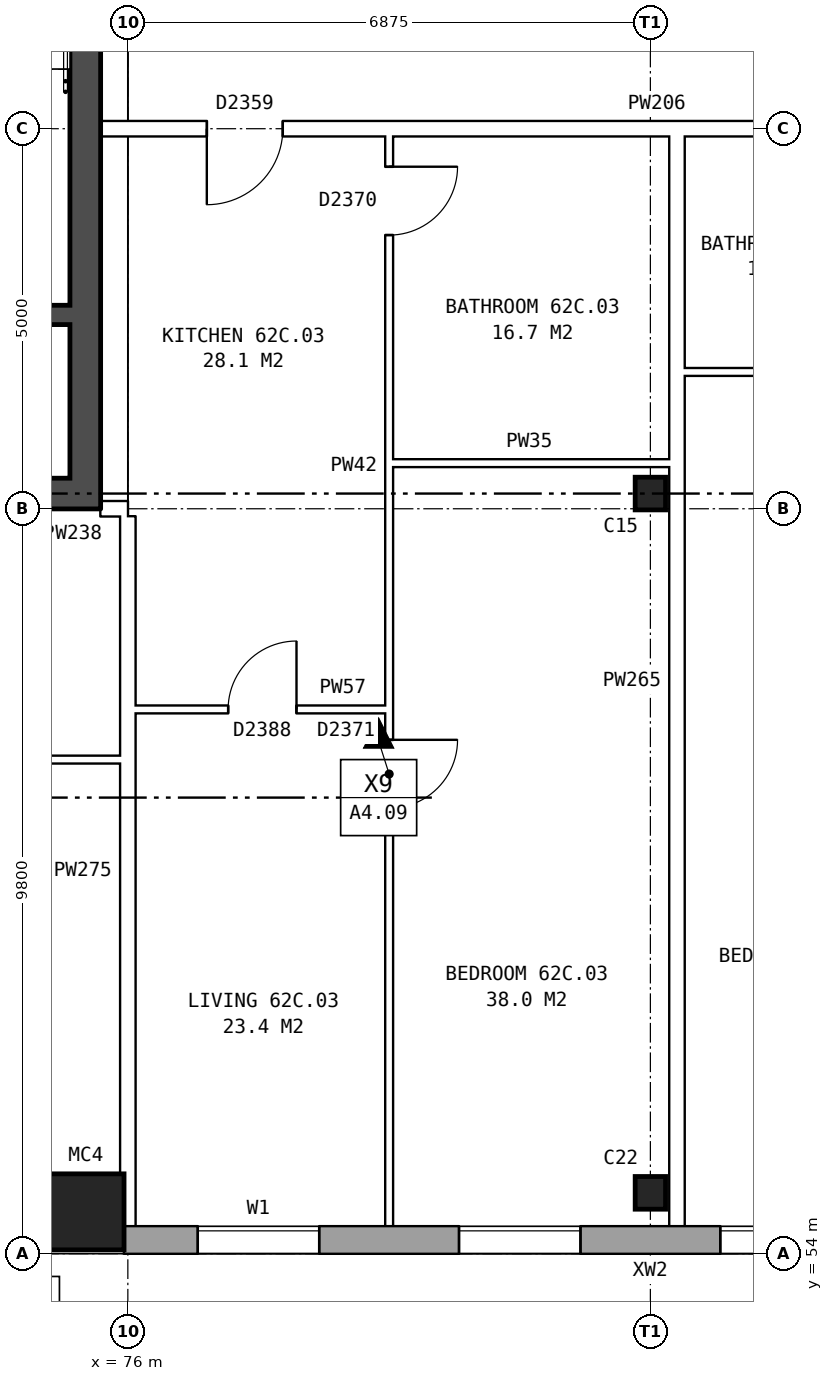
"""IFC4 building model, lengths in metres.
Left out: names, types, materials, properties, quantities, classifications, styles, units other than length and angle.
Written with IfcOpenShell. Run it as: python <this file> out.ifc"""

import sys

from ifc_helpers import new_model, si_unit, direction, frame, frame_2d, origin, origin_2d, place, context, subcontext, project, spatial, rectangle, hollow_rectangle, i_section, extrude, element, fill, save


model = new_model("IFC4")
c1 = context("Model", 3, precision=1e-05, world=origin(), true_north=direction((0.0, 1.0)))
c2 = subcontext(c1, "Body", "Model", "MODEL_VIEW")
j1 = project(units=[si_unit("LENGTHUNIT", "METRE"), si_unit("PLANEANGLEUNIT", "RADIAN")], contexts=[c1])
p1 = place(None, origin())
s1 = spatial("IfcSite", under=j1, at=p1, CompositionType="ELEMENT")
p2 = place(p1, origin())
s2 = spatial("IfcBuilding", under=s1, at=p2, CompositionType="ELEMENT")
p3 = place(p2, frame((0.0, 0.0, 221.4)))
s3 = spatial("IfcBuildingStorey", under=s2, at=p3, CompositionType="ELEMENT", Elevation=221.4)
p4 = place(p3, frame((75.45, 54.55, 0.0), z_axis=(0.0, 0.0, 1.0), x_axis=(1.0, 0.0, 0.0)))
e1 = element("IfcColumn", 1, at=p4, inside=s3, PredefinedType="COLUMN", context=c2, shape_type="SweptSolid", body=[
    extrude(hollow_rectangle(XDim=1.0, YDim=1.0, WallThickness=0.055, at=origin_2d()), origin(), (0.0, 0.0, 1.0), 3.1),
])
for number, where, z_axis, x_axis in (
    (2, (82.875, 54.8, 0.0), (0.0, 0.0, 1.0), (1.0, 0.0, 0.0)),
    (3, (82.875, 64.0, 0.0), (0.0, 0.0, 1.0), (1.0, 0.0, 0.0)),
):
    element("IfcColumn", number, at=place(p3, frame(where, z_axis=z_axis, x_axis=x_axis)), inside=s3, PredefinedType="COLUMN", context=c2, shape_type="SweptSolid", body=[
        extrude(i_section(OverallWidth=0.4, OverallDepth=0.43, WebThickness=0.04, FlangeThickness=0.04, at=origin_2d()), origin(), (0.0, 0.0, 1.0), 2.85),
    ])
p5 = place(p3, frame((75.95, 54.18, 0.0), z_axis=(0.0, 0.0, 1.0), x_axis=(1.0, 0.0, 0.0)))
e4 = element("IfcWall", 4, at=p5, inside=s3, PredefinedType="STANDARD", context=c2, shape_type="SweptSolid", body=[
    extrude(rectangle(XDim=55.1, YDim=0.36, at=frame_2d((27.55, 0.0))), origin(), (0.0, 0.0, 1.0), 2.85),
])
p6 = place(p5, frame((0.969, 0.0, 0.8)))
e5 = element("IfcOpeningElement", 5, at=p6, cuts=e4, PredefinedType="OPENING", context=c2, shape_type="SweptSolid", body=[
    extrude(rectangle(XDim=1.6, YDim=1.8, at=frame_2d((0.8, 0.9))), frame((0.0, 0.19, 0.0), z_axis=(0.0, -1.0, 0.0), x_axis=(1.0, 0.0, 0.0)), (0.0, 0.0, 1.0), 0.38),
])
p7 = place(p5, frame((4.406, 0.0, 0.8)))
e6 = element("IfcOpeningElement", 6, at=p7, cuts=e4, PredefinedType="OPENING", context=c2, shape_type="SweptSolid", body=[
    extrude(rectangle(XDim=1.6, YDim=1.8, at=frame_2d((0.8, 0.9))), frame((0.0, 0.19, 0.0), z_axis=(0.0, -1.0, 0.0), x_axis=(1.0, 0.0, 0.0)), (0.0, 0.0, 1.0), 0.38),
])
p8 = place(p5, frame((7.844, 0.0, 0.8)))
e7 = element("IfcOpeningElement", 7, at=p8, cuts=e4, PredefinedType="OPENING", context=c2, shape_type="SweptSolid", body=[
    extrude(rectangle(XDim=1.6, YDim=1.8, at=frame_2d((0.8, 0.9))), frame((0.0, 0.19, 0.0), z_axis=(0.0, -1.0, 0.0), x_axis=(1.0, 0.0, 0.0)), (0.0, 0.0, 1.0), 0.38),
])
p9 = place(p5, frame((11.281, 0.0, 0.8)))
e8 = element("IfcOpeningElement", 8, at=p9, cuts=e4, PredefinedType="OPENING", context=c2, shape_type="SweptSolid", body=[
    extrude(rectangle(XDim=1.6, YDim=1.8, at=frame_2d((0.8, 0.9))), frame((0.0, 0.19, 0.0), z_axis=(0.0, -1.0, 0.0), x_axis=(1.0, 0.0, 0.0)), (0.0, 0.0, 1.0), 0.38),
])
p10 = place(p5, frame((14.719, 0.0, 0.8)))
e9 = element("IfcOpeningElement", 9, at=p10, cuts=e4, PredefinedType="OPENING", context=c2, shape_type="SweptSolid", body=[
    extrude(rectangle(XDim=1.6, YDim=1.8, at=frame_2d((0.8, 0.9))), frame((0.0, 0.19, 0.0), z_axis=(0.0, -1.0, 0.0), x_axis=(1.0, 0.0, 0.0)), (0.0, 0.0, 1.0), 0.38),
])
p11 = place(p5, frame((18.156, 0.0, 0.8)))
e10 = element("IfcOpeningElement", 10, at=p11, cuts=e4, PredefinedType="OPENING", context=c2, shape_type="SweptSolid", body=[
    extrude(rectangle(XDim=1.6, YDim=1.8, at=frame_2d((0.8, 0.9))), frame((0.0, 0.19, 0.0), z_axis=(0.0, -1.0, 0.0), x_axis=(1.0, 0.0, 0.0)), (0.0, 0.0, 1.0), 0.38),
])
p12 = place(p5, frame((21.594, 0.0, 0.8)))
e11 = element("IfcOpeningElement", 11, at=p12, cuts=e4, PredefinedType="OPENING", context=c2, shape_type="SweptSolid", body=[
    extrude(rectangle(XDim=1.6, YDim=1.8, at=frame_2d((0.8, 0.9))), frame((0.0, 0.19, 0.0), z_axis=(0.0, -1.0, 0.0), x_axis=(1.0, 0.0, 0.0)), (0.0, 0.0, 1.0), 0.38),
])
p13 = place(p5, frame((25.031, 0.0, 0.8)))
e12 = element("IfcOpeningElement", 12, at=p13, cuts=e4, PredefinedType="OPENING", context=c2, shape_type="SweptSolid", body=[
    extrude(rectangle(XDim=1.6, YDim=1.8, at=frame_2d((0.8, 0.9))), frame((0.0, 0.19, 0.0), z_axis=(0.0, -1.0, 0.0), x_axis=(1.0, 0.0, 0.0)), (0.0, 0.0, 1.0), 0.38),
])
p14 = place(p5, frame((28.469, 0.0, 0.8)))
e13 = element("IfcOpeningElement", 13, at=p14, cuts=e4, PredefinedType="OPENING", context=c2, shape_type="SweptSolid", body=[
    extrude(rectangle(XDim=1.6, YDim=1.8, at=frame_2d((0.8, 0.9))), frame((0.0, 0.19, 0.0), z_axis=(0.0, -1.0, 0.0), x_axis=(1.0, 0.0, 0.0)), (0.0, 0.0, 1.0), 0.38),
])
p15 = place(p5, frame((31.906, 0.0, 0.8)))
e14 = element("IfcOpeningElement", 14, at=p15, cuts=e4, PredefinedType="OPENING", context=c2, shape_type="SweptSolid", body=[
    extrude(rectangle(XDim=1.6, YDim=1.8, at=frame_2d((0.8, 0.9))), frame((0.0, 0.19, 0.0), z_axis=(0.0, -1.0, 0.0), x_axis=(1.0, 0.0, 0.0)), (0.0, 0.0, 1.0), 0.38),
])
p16 = place(p5, frame((35.344, 0.0, 0.8)))
e15 = element("IfcOpeningElement", 15, at=p16, cuts=e4, PredefinedType="OPENING", context=c2, shape_type="SweptSolid", body=[
    extrude(rectangle(XDim=1.6, YDim=1.8, at=frame_2d((0.8, 0.9))), frame((0.0, 0.19, 0.0), z_axis=(0.0, -1.0, 0.0), x_axis=(1.0, 0.0, 0.0)), (0.0, 0.0, 1.0), 0.38),
])
p17 = place(p5, frame((38.781, 0.0, 0.8)))
e16 = element("IfcOpeningElement", 16, at=p17, cuts=e4, PredefinedType="OPENING", context=c2, shape_type="SweptSolid", body=[
    extrude(rectangle(XDim=1.6, YDim=1.8, at=frame_2d((0.8, 0.9))), frame((0.0, 0.19, 0.0), z_axis=(0.0, -1.0, 0.0), x_axis=(1.0, 0.0, 0.0)), (0.0, 0.0, 1.0), 0.38),
])
p18 = place(p5, frame((42.219, 0.0, 0.8)))
e17 = element("IfcOpeningElement", 17, at=p18, cuts=e4, PredefinedType="OPENING", context=c2, shape_type="SweptSolid", body=[
    extrude(rectangle(XDim=1.6, YDim=1.8, at=frame_2d((0.8, 0.9))), frame((0.0, 0.19, 0.0), z_axis=(0.0, -1.0, 0.0), x_axis=(1.0, 0.0, 0.0)), (0.0, 0.0, 1.0), 0.38),
])
p19 = place(p5, frame((45.656, 0.0, 0.8)))
e18 = element("IfcOpeningElement", 18, at=p19, cuts=e4, PredefinedType="OPENING", context=c2, shape_type="SweptSolid", body=[
    extrude(rectangle(XDim=1.6, YDim=1.8, at=frame_2d((0.8, 0.9))), frame((0.0, 0.19, 0.0), z_axis=(0.0, -1.0, 0.0), x_axis=(1.0, 0.0, 0.0)), (0.0, 0.0, 1.0), 0.38),
])
p20 = place(p5, frame((49.094, 0.0, 0.8)))
e19 = element("IfcOpeningElement", 19, at=p20, cuts=e4, PredefinedType="OPENING", context=c2, shape_type="SweptSolid", body=[
    extrude(rectangle(XDim=1.6, YDim=1.8, at=frame_2d((0.8, 0.9))), frame((0.0, 0.19, 0.0), z_axis=(0.0, -1.0, 0.0), x_axis=(1.0, 0.0, 0.0)), (0.0, 0.0, 1.0), 0.38),
])
p21 = place(p5, frame((52.531, 0.0, 0.8)))
e20 = element("IfcOpeningElement", 20, at=p21, cuts=e4, PredefinedType="OPENING", context=c2, shape_type="SweptSolid", body=[
    extrude(rectangle(XDim=1.6, YDim=1.8, at=frame_2d((0.8, 0.9))), frame((0.0, 0.19, 0.0), z_axis=(0.0, -1.0, 0.0), x_axis=(1.0, 0.0, 0.0)), (0.0, 0.0, 1.0), 0.38),
])
p22 = place(p3, frame((75.44, 63.8, 0.0), z_axis=(0.0, 0.0, 1.0), x_axis=(0.0, 1.0, 0.0)))
e21 = element("IfcWall", 21, at=p22, inside=s3, PredefinedType="SHEAR", context=c2, shape_type="SweptSolid", body=[
    extrude(rectangle(XDim=12.4, YDim=0.4, at=frame_2d((6.2, 0.0))), origin(), (0.0, 0.0, 1.0), 2.85),
])
p23 = place(p22, frame((9.8, 0.0, 0.0)))
e22 = element("IfcOpeningElement", 22, at=p23, cuts=e21, PredefinedType="OPENING", context=c2, shape_type="SweptSolid", body=[
    extrude(rectangle(XDim=1.1, YDim=2.1, at=frame_2d((0.55, 1.05))), frame((0.0, 0.21, 0.0), z_axis=(0.0, -1.0, 0.0), x_axis=(1.0, 0.0, 0.0)), (0.0, 0.0, 1.0), 0.42),
])
p24 = place(p3, frame((67.04, 64.0, 0.0), z_axis=(0.0, 0.0, 1.0), x_axis=(1.0, 0.0, 0.0)))
e23 = element("IfcWall", 23, at=p24, inside=s3, PredefinedType="SHEAR", context=c2, shape_type="SweptSolid", body=[
    extrude(rectangle(XDim=8.2, YDim=0.4, at=frame_2d((4.1, 0.0))), origin(), (0.0, 0.0, 1.0), 2.85),
])
p25 = place(p3, frame((72.165, 66.35, 0.0), z_axis=(0.0, 0.0, 1.0), x_axis=(1.0, 0.0, 0.0)))
e24 = element("IfcWall", 24, at=p25, inside=s3, PredefinedType="SHEAR", context=c2, shape_type="SweptSolid", body=[
    extrude(rectangle(XDim=3.075, YDim=0.25, at=frame_2d((1.538, 0.0))), origin(), (0.0, 0.0, 1.0), 2.85),
])
p26 = place(p3, frame((70.1, 60.5, 0.0), z_axis=(0.0, 0.0, 1.0), x_axis=(1.0, 0.0, 0.0)))
e25 = element("IfcWall", 25, at=p26, inside=s3, PredefinedType="PARTITIONING", context=c2, shape_type="SweptSolid", body=[
    extrude(rectangle(XDim=5.8, YDim=0.1, at=frame_2d((2.9, 0.0))), origin(), (0.0, 0.0, 1.0), 2.85),
])
p27 = place(p3, frame((76.1, 61.16, 0.0), z_axis=(0.0, 0.0, 1.0), x_axis=(1.0, 0.0, 0.0)))
e26 = element("IfcWall", 26, at=p27, inside=s3, PredefinedType="PARTITIONING", context=c2, shape_type="SweptSolid", body=[
    extrude(rectangle(XDim=3.338, YDim=0.1, at=frame_2d((1.669, 0.0))), origin(), (0.0, 0.0, 1.0), 2.85),
])
p28 = place(p27, frame((1.219, 0.0, 0.0)))
e27 = element("IfcOpeningElement", 27, at=p28, cuts=e26, PredefinedType="OPENING", context=c2, shape_type="SweptSolid", body=[
    extrude(rectangle(XDim=0.9, YDim=2.1, at=frame_2d((0.45, 1.05))), frame((0.0, 0.06, 0.0), z_axis=(0.0, -1.0, 0.0), x_axis=(1.0, 0.0, 0.0)), (0.0, 0.0, 1.0), 0.12),
])
p29 = place(p3, frame((75.64, 63.8, 0.0), z_axis=(0.0, 0.0, 1.0), x_axis=(1.0, 0.0, 0.0)))
e28 = element("IfcWall", 28, at=p29, inside=s3, PredefinedType="PARTITIONING", context=c2, shape_type="SweptSolid", body=[
    extrude(rectangle(XDim=0.36, YDim=0.2, at=frame_2d((0.18, 0.0))), origin(), (0.0, 0.0, 1.0), 2.85),
])
p30 = place(p3, frame((79.438, 64.4, 0.0), z_axis=(0.0, 0.0, 1.0), x_axis=(1.0, 0.0, 0.0)))
e29 = element("IfcWall", 29, at=p30, inside=s3, PredefinedType="PARTITIONING", context=c2, shape_type="SweptSolid", body=[
    extrude(rectangle(XDim=3.687, YDim=0.1, at=frame_2d((1.844, 0.0))), origin(), (0.0, 0.0, 1.0), 2.85),
])
p31 = place(p3, frame((83.325, 65.6, 0.0), z_axis=(0.0, 0.0, 1.0), x_axis=(1.0, 0.0, 0.0)))
e30 = element("IfcWall", 30, at=p31, inside=s3, PredefinedType="PARTITIONING", context=c2, shape_type="SweptSolid", body=[
    extrude(rectangle(XDim=3.337, YDim=0.1, at=frame_2d((1.668, 0.0))), origin(), (0.0, 0.0, 1.0), 2.85),
])
p32 = place(p3, frame((75.64, 68.8, 0.0), z_axis=(0.0, 0.0, 1.0), x_axis=(1.0, 0.0, 0.0)))
e31 = element("IfcWall", 31, at=p32, inside=s3, PredefinedType="PARTITIONING", context=c2, shape_type="SweptSolid", body=[
    extrude(rectangle(XDim=55.72, YDim=0.2, at=frame_2d((27.86, 0.0))), origin(), (0.0, 0.0, 1.0), 2.85),
])
p33 = place(p32, frame((1.399, 0.0, 0.0)))
e32 = element("IfcOpeningElement", 32, at=p33, cuts=e31, PredefinedType="OPENING", context=c2, shape_type="SweptSolid", body=[
    extrude(rectangle(XDim=1.0, YDim=2.1, at=frame_2d((0.5, 1.05))), frame((0.0, 0.11, 0.0), z_axis=(0.0, -1.0, 0.0), x_axis=(1.0, 0.0, 0.0)), (0.0, 0.0, 1.0), 0.22),
])
p34 = place(p32, frame((12.241, 0.0, 0.0)))
e33 = element("IfcOpeningElement", 33, at=p34, cuts=e31, PredefinedType="OPENING", context=c2, shape_type="SweptSolid", body=[
    extrude(rectangle(XDim=1.0, YDim=2.1, at=frame_2d((0.5, 1.05))), frame((0.0, 0.11, 0.0), z_axis=(0.0, -1.0, 0.0), x_axis=(1.0, 0.0, 0.0)), (0.0, 0.0, 1.0), 0.22),
])
p35 = place(p32, frame((22.553, 0.0, 0.0)))
e34 = element("IfcOpeningElement", 34, at=p35, cuts=e31, PredefinedType="OPENING", context=c2, shape_type="SweptSolid", body=[
    extrude(rectangle(XDim=1.0, YDim=2.1, at=frame_2d((0.5, 1.05))), frame((0.0, 0.11, 0.0), z_axis=(0.0, -1.0, 0.0), x_axis=(1.0, 0.0, 0.0)), (0.0, 0.0, 1.0), 0.22),
])
p36 = place(p32, frame((32.866, 0.0, 0.0)))
e35 = element("IfcOpeningElement", 35, at=p36, cuts=e31, PredefinedType="OPENING", context=c2, shape_type="SweptSolid", body=[
    extrude(rectangle(XDim=1.0, YDim=2.1, at=frame_2d((0.5, 1.05))), frame((0.0, 0.11, 0.0), z_axis=(0.0, -1.0, 0.0), x_axis=(1.0, 0.0, 0.0)), (0.0, 0.0, 1.0), 0.22),
])
p37 = place(p32, frame((36.303, 0.0, 0.0)))
e36 = element("IfcOpeningElement", 36, at=p37, cuts=e31, PredefinedType="OPENING", context=c2, shape_type="SweptSolid", body=[
    extrude(rectangle(XDim=1.0, YDim=2.1, at=frame_2d((0.5, 1.05))), frame((0.0, 0.11, 0.0), z_axis=(0.0, -1.0, 0.0), x_axis=(1.0, 0.0, 0.0)), (0.0, 0.0, 1.0), 0.22),
])
p38 = place(p32, frame((46.616, 0.0, 0.0)))
e37 = element("IfcOpeningElement", 37, at=p38, cuts=e31, PredefinedType="OPENING", context=c2, shape_type="SweptSolid", body=[
    extrude(rectangle(XDim=1.0, YDim=2.1, at=frame_2d((0.5, 1.05))), frame((0.0, 0.11, 0.0), z_axis=(0.0, -1.0, 0.0), x_axis=(1.0, 0.0, 0.0)), (0.0, 0.0, 1.0), 0.22),
])
p39 = place(p32, frame((50.053, 0.0, 0.0)))
e38 = element("IfcOpeningElement", 38, at=p39, cuts=e31, PredefinedType="OPENING", context=c2, shape_type="SweptSolid", body=[
    extrude(rectangle(XDim=1.0, YDim=2.1, at=frame_2d((0.5, 1.05))), frame((0.0, 0.11, 0.0), z_axis=(0.0, -1.0, 0.0), x_axis=(1.0, 0.0, 0.0)), (0.0, 0.0, 1.0), 0.22),
])
p40 = place(p3, frame((76.0, 54.36, 0.0), z_axis=(0.0, 0.0, 1.0), x_axis=(0.0, 1.0, 0.0)))
e39 = element("IfcWall", 39, at=p40, inside=s3, PredefinedType="PARTITIONING", context=c2, shape_type="SweptSolid", body=[
    extrude(rectangle(XDim=9.34, YDim=0.2, at=frame_2d((4.67, 0.0))), origin(), (0.0, 0.0, 1.0), 2.85),
])
p41 = place(p3, frame((79.438, 54.36, 0.0), z_axis=(0.0, 0.0, 1.0), x_axis=(0.0, 1.0, 0.0)))
e40 = element("IfcWall", 40, at=p41, inside=s3, PredefinedType="PARTITIONING", context=c2, shape_type="SweptSolid", body=[
    extrude(rectangle(XDim=14.34, YDim=0.1, at=frame_2d((7.17, 0.0))), origin(), (0.0, 0.0, 1.0), 2.85),
])
p42 = place(p41, frame((5.5, 0.0, 0.0)))
e41 = element("IfcOpeningElement", 41, at=p42, cuts=e40, PredefinedType="OPENING", context=c2, shape_type="SweptSolid", body=[
    extrude(rectangle(XDim=0.9, YDim=2.1, at=frame_2d((0.45, 1.05))), frame((0.0, 0.06, 0.0), z_axis=(0.0, -1.0, 0.0), x_axis=(1.0, 0.0, 0.0)), (0.0, 0.0, 1.0), 0.12),
])
p43 = place(p41, frame((13.04, 0.0, 0.0)))
e42 = element("IfcOpeningElement", 42, at=p43, cuts=e40, PredefinedType="OPENING", context=c2, shape_type="SweptSolid", body=[
    extrude(rectangle(XDim=0.9, YDim=2.1, at=frame_2d((0.45, 1.05))), frame((0.0, 0.06, 0.0), z_axis=(0.0, -1.0, 0.0), x_axis=(1.0, 0.0, 0.0)), (0.0, 0.0, 1.0), 0.12),
])
p44 = place(p3, frame((83.225, 54.36, 0.0), z_axis=(0.0, 0.0, 1.0), x_axis=(0.0, 1.0, 0.0)))
e43 = element("IfcWall", 43, at=p44, inside=s3, PredefinedType="PARTITIONING", context=c2, shape_type="SweptSolid", body=[
    extrude(rectangle(XDim=14.34, YDim=0.2, at=frame_2d((7.17, 0.0))), origin(), (0.0, 0.0, 1.0), 2.85),
])
p45 = place(p6, origin())
e44 = element("IfcWindow", 44, at=p45, inside=s3, PartitioningType="SINGLE_PANEL", PredefinedType="WINDOW", context=c2, shape_type="SweptSolid", body=[
    extrude(rectangle(XDim=1.6, YDim=1.8, at=frame_2d((0.8, 0.9))), frame((0.0, 0.15, 0.0), z_axis=(0.0, -1.0, 0.0), x_axis=(1.0, 0.0, 0.0)), (0.0, 0.0, 1.0), 0.06),
])
fill(e5, e44)
p46 = place(p7, origin())
e45 = element("IfcWindow", 45, at=p46, inside=s3, PartitioningType="SINGLE_PANEL", PredefinedType="WINDOW", context=c2, shape_type="SweptSolid", body=[
    extrude(rectangle(XDim=1.6, YDim=1.8, at=frame_2d((0.8, 0.9))), frame((0.0, 0.15, 0.0), z_axis=(0.0, -1.0, 0.0), x_axis=(1.0, 0.0, 0.0)), (0.0, 0.0, 1.0), 0.06),
])
fill(e6, e45)
p47 = place(p8, origin())
e46 = element("IfcWindow", 46, at=p47, inside=s3, PartitioningType="SINGLE_PANEL", PredefinedType="WINDOW", context=c2, shape_type="SweptSolid", body=[
    extrude(rectangle(XDim=1.6, YDim=1.8, at=frame_2d((0.8, 0.9))), frame((0.0, 0.15, 0.0), z_axis=(0.0, -1.0, 0.0), x_axis=(1.0, 0.0, 0.0)), (0.0, 0.0, 1.0), 0.06),
])
fill(e7, e46)
p48 = place(p42, frame((0.9, 0.0, 0.0), z_axis=(0.0, 0.0, 1.0), x_axis=(-1.0, 0.0, 0.0)))
e47 = element("IfcDoor", 47, at=p48, inside=s3, OperationType="SINGLE_SWING_LEFT", PredefinedType="DOOR", context=c2, shape_type="SweptSolid", body=[
    extrude(rectangle(XDim=0.9, YDim=2.1, at=frame_2d((0.45, 1.05))), frame((0.0, 0.025, 0.0), z_axis=(0.0, -1.0, 0.0), x_axis=(1.0, 0.0, 0.0)), (0.0, 0.0, 1.0), 0.05),
])
fill(e41, e47)
p49 = place(p33, frame((1.0, 0.0, 0.0), z_axis=(0.0, 0.0, 1.0), x_axis=(-1.0, 0.0, 0.0)))
e48 = element("IfcDoor", 48, at=p49, inside=s3, OperationType="SINGLE_SWING_RIGHT", PredefinedType="DOOR", context=c2, shape_type="SweptSolid", body=[
    extrude(rectangle(XDim=1.0, YDim=2.1, at=frame_2d((0.5, 1.05))), frame((0.0, 0.025, 0.0), z_axis=(0.0, -1.0, 0.0), x_axis=(1.0, 0.0, 0.0)), (0.0, 0.0, 1.0), 0.05),
])
fill(e32, e48)
p50 = place(p28, origin())
e49 = element("IfcDoor", 49, at=p50, inside=s3, OperationType="SINGLE_SWING_RIGHT", PredefinedType="DOOR", context=c2, shape_type="SweptSolid", body=[
    extrude(rectangle(XDim=0.9, YDim=2.1, at=frame_2d((0.45, 1.05))), frame((0.0, 0.025, 0.0), z_axis=(0.0, -1.0, 0.0), x_axis=(1.0, 0.0, 0.0)), (0.0, 0.0, 1.0), 0.05),
])
fill(e27, e49)
p51 = place(p43, frame((0.9, 0.0, 0.0), z_axis=(0.0, 0.0, 1.0), x_axis=(-1.0, 0.0, 0.0)))
e50 = element("IfcDoor", 50, at=p51, inside=s3, OperationType="SINGLE_SWING_LEFT", PredefinedType="DOOR", context=c2, shape_type="SweptSolid", body=[
    extrude(rectangle(XDim=0.9, YDim=2.1, at=frame_2d((0.45, 1.05))), frame((0.0, 0.025, 0.0), z_axis=(0.0, -1.0, 0.0), x_axis=(1.0, 0.0, 0.0)), (0.0, 0.0, 1.0), 0.05),
])
fill(e42, e50)
save(model, sys.argv[1])
